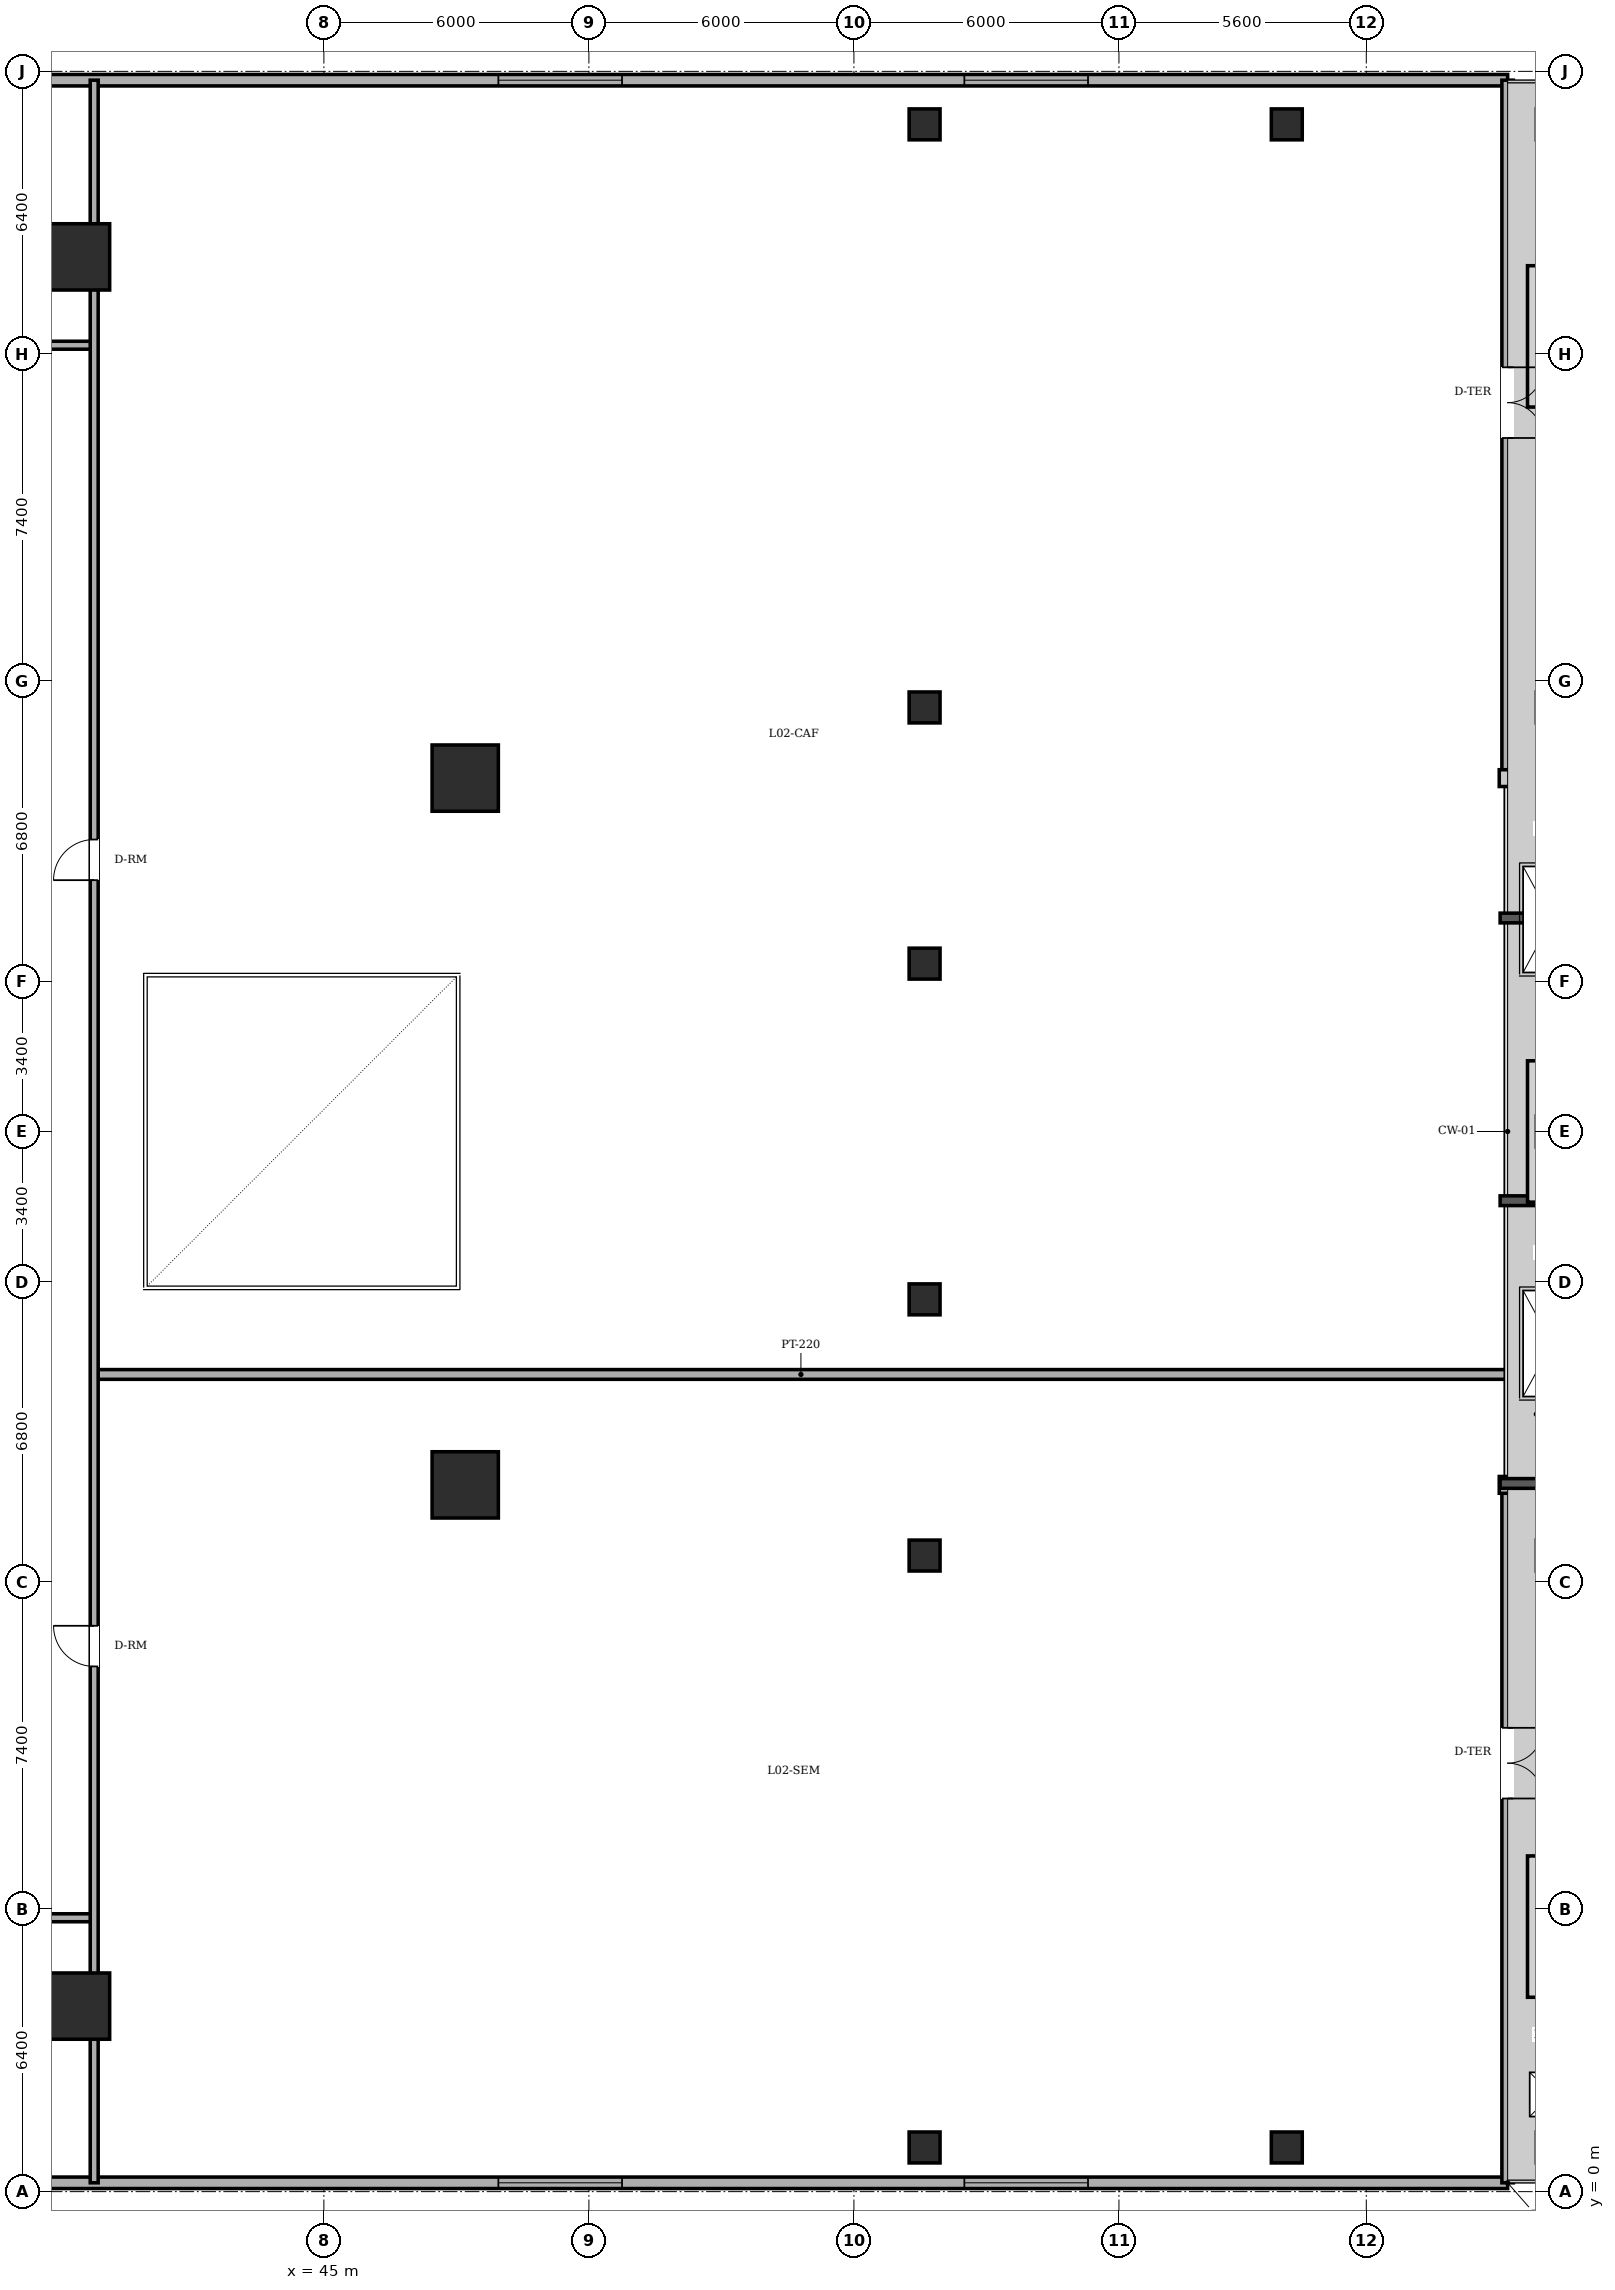
"""IFC4 building model, lengths in metres.
Left out: names, types, materials, properties, quantities, classifications, styles, units other than length and angle.
Written with IfcOpenShell. Run it as: python <this file> out.ifc"""

import sys

from ifc_helpers import new_model, si_unit, direction, frame, frame_2d, origin, origin_2d, place, context, subcontext, project, spatial, rectangle, circle, extrude, element, fill, save


model = new_model("IFC4")
c1 = context("Model", 3, precision=1e-05, world=origin(), true_north=direction((0.0, 1.0)))
c2 = subcontext(c1, "Body", "Model", "MODEL_VIEW")
j1 = project(units=[si_unit("LENGTHUNIT", "METRE"), si_unit("PLANEANGLEUNIT", "RADIAN")], contexts=[c1])
p1 = place(None, origin())
s1 = spatial("IfcSite", under=j1, at=p1, CompositionType="ELEMENT")
p2 = place(p1, origin())
s2 = spatial("IfcBuilding", under=s1, at=p2, CompositionType="ELEMENT")
p3 = place(p2, frame((0.0, 0.0, 5.4)))
s3 = spatial("IfcBuildingStorey", under=s2, at=p3, CompositionType="ELEMENT", Elevation=5.4)
for number, where, z_axis, x_axis in (
    (1, (39.4, 4.2, 0.0), (0.0, 0.0, 1.0), (1.0, 0.0, 0.0)),
    (2, (48.2, 16.0, 0.0), (0.0, 0.0, 1.0), (1.0, 0.0, 0.0)),
    (3, (48.2, 32.0, 0.0), (0.0, 0.0, 1.0), (1.0, 0.0, 0.0)),
    (4, (39.4, 43.8, 0.0), (0.0, 0.0, 1.0), (1.0, 0.0, 0.0)),
):
    element("IfcColumn", number, at=place(p3, frame(where, z_axis=z_axis, x_axis=x_axis)), inside=s3, PredefinedType="COLUMN", context=c2, shape_type="SweptSolid", body=[
        extrude(circle(Radius=0.75, at=origin_2d()), origin(), (0.0, 0.0, 1.0), 4.65),
    ])
for number, where, z_axis, x_axis in (
    (5, (58.6, 1.0, 0.0), (0.0, 0.0, 1.0), (1.0, 0.0, 0.0)),
    (6, (58.6, 46.8, 0.0), (0.0, 0.0, 1.0), (1.0, 0.0, 0.0)),
    (7, (58.6, 20.2, 0.0), (0.0, 0.0, 1.0), (1.0, 0.0, 0.0)),
    (8, (58.6, 27.8, 0.0), (0.0, 0.0, 1.0), (1.0, 0.0, 0.0)),
    (9, (58.6, 14.4, 0.0), (0.0, 0.0, 1.0), (1.0, 0.0, 0.0)),
    (10, (58.6, 33.6, 0.0), (0.0, 0.0, 1.0), (1.0, 0.0, 0.0)),
    (11, (66.8, 1.0, 0.0), (0.0, 0.0, 1.0), (1.0, 0.0, 0.0)),
    (12, (66.8, 46.8, 0.0), (0.0, 0.0, 1.0), (1.0, 0.0, 0.0)),
):
    element("IfcColumn", number, at=place(p3, frame(where, z_axis=z_axis, x_axis=x_axis)), inside=s3, PredefinedType="COLUMN", context=c2, shape_type="SweptSolid", body=[
        extrude(rectangle(XDim=0.7, YDim=0.7, at=origin_2d()), origin(), (0.0, 0.0, 1.0), 4.65),
    ])
p4 = place(p3, frame((71.8, 0.2, 0.0), z_axis=(0.0, 0.0, 1.0), x_axis=(-1.0, 0.0, 0.0)))
e13 = element("IfcWall", 13, at=p4, inside=s3, PredefinedType="SOLIDWALL", context=c2, shape_type="SweptSolid", body=[
    extrude(rectangle(XDim=70.2, YDim=0.26, at=frame_2d((35.1, 0.0))), origin(), (0.0, 0.0, 1.0), 4.43),
])
p5 = place(p4, frame((9.5, 0.0, 0.9)))
e14 = element("IfcOpeningElement", 14, at=p5, cuts=e13, PredefinedType="OPENING", context=c2, shape_type="SweptSolid", body=[
    extrude(rectangle(XDim=2.8, YDim=2.4, at=frame_2d((1.4, 1.2))), frame((0.0, 0.14, 0.0), z_axis=(0.0, -1.0, 0.0), x_axis=(1.0, 0.0, 0.0)), (0.0, 0.0, 1.0), 0.28),
])
p6 = place(p4, frame((20.05, 0.0, 0.9)))
e15 = element("IfcOpeningElement", 15, at=p6, cuts=e13, PredefinedType="OPENING", context=c2, shape_type="SweptSolid", body=[
    extrude(rectangle(XDim=2.8, YDim=2.4, at=frame_2d((1.4, 1.2))), frame((0.0, 0.14, 0.0), z_axis=(0.0, -1.0, 0.0), x_axis=(1.0, 0.0, 0.0)), (0.0, 0.0, 1.0), 0.28),
])
p7 = place(p4, frame((36.733, 0.0, 0.9)))
e16 = element("IfcOpeningElement", 16, at=p7, cuts=e13, PredefinedType="OPENING", context=c2, shape_type="SweptSolid", body=[
    extrude(rectangle(XDim=2.8, YDim=2.4, at=frame_2d((1.4, 1.2))), frame((0.0, 0.14, 0.0), z_axis=(0.0, -1.0, 0.0), x_axis=(1.0, 0.0, 0.0)), (0.0, 0.0, 1.0), 0.28),
])
p8 = place(p4, frame((42.867, 0.0, 0.9)))
e17 = element("IfcOpeningElement", 17, at=p8, cuts=e13, PredefinedType="OPENING", context=c2, shape_type="SweptSolid", body=[
    extrude(rectangle(XDim=2.8, YDim=2.4, at=frame_2d((1.4, 1.2))), frame((0.0, 0.14, 0.0), z_axis=(0.0, -1.0, 0.0), x_axis=(1.0, 0.0, 0.0)), (0.0, 0.0, 1.0), 0.28),
])
p9 = place(p4, frame((55.483, 0.0, 0.9)))
e18 = element("IfcOpeningElement", 18, at=p9, cuts=e13, PredefinedType="OPENING", context=c2, shape_type="SweptSolid", body=[
    extrude(rectangle(XDim=2.8, YDim=2.4, at=frame_2d((1.4, 1.2))), frame((0.0, 0.14, 0.0), z_axis=(0.0, -1.0, 0.0), x_axis=(1.0, 0.0, 0.0)), (0.0, 0.0, 1.0), 0.28),
])
p10 = place(p3, frame((1.6, 47.8, 0.0), z_axis=(0.0, 0.0, 1.0), x_axis=(1.0, 0.0, 0.0)))
e19 = element("IfcWall", 19, at=p10, inside=s3, PredefinedType="SOLIDWALL", context=c2, shape_type="SweptSolid", body=[
    extrude(rectangle(XDim=70.2, YDim=0.26, at=frame_2d((35.1, 0.0))), origin(), (0.0, 0.0, 1.0), 4.43),
])
p11 = place(p10, frame((11.567, 0.0, 0.9)))
e20 = element("IfcOpeningElement", 20, at=p11, cuts=e19, PredefinedType="OPENING", context=c2, shape_type="SweptSolid", body=[
    extrude(rectangle(XDim=2.8, YDim=2.4, at=frame_2d((1.4, 1.2))), frame((0.0, 0.14, 0.0), z_axis=(0.0, -1.0, 0.0), x_axis=(1.0, 0.0, 0.0)), (0.0, 0.0, 1.0), 0.28),
])
p12 = place(p10, frame((24.183, 0.0, 0.9)))
e21 = element("IfcOpeningElement", 21, at=p12, cuts=e19, PredefinedType="OPENING", context=c2, shape_type="SweptSolid", body=[
    extrude(rectangle(XDim=2.8, YDim=2.4, at=frame_2d((1.4, 1.2))), frame((0.0, 0.14, 0.0), z_axis=(0.0, -1.0, 0.0), x_axis=(1.0, 0.0, 0.0)), (0.0, 0.0, 1.0), 0.28),
])
p13 = place(p10, frame((47.35, 0.0, 0.9)))
e22 = element("IfcOpeningElement", 22, at=p13, cuts=e19, PredefinedType="OPENING", context=c2, shape_type="SweptSolid", body=[
    extrude(rectangle(XDim=2.8, YDim=2.4, at=frame_2d((1.4, 1.2))), frame((0.0, 0.14, 0.0), z_axis=(0.0, -1.0, 0.0), x_axis=(1.0, 0.0, 0.0)), (0.0, 0.0, 1.0), 0.28),
])
p14 = place(p10, frame((57.9, 0.0, 0.9)))
e23 = element("IfcOpeningElement", 23, at=p14, cuts=e19, PredefinedType="OPENING", context=c2, shape_type="SweptSolid", body=[
    extrude(rectangle(XDim=2.8, YDim=2.4, at=frame_2d((1.4, 1.2))), frame((0.0, 0.14, 0.0), z_axis=(0.0, -1.0, 0.0), x_axis=(1.0, 0.0, 0.0)), (0.0, 0.0, 1.0), 0.28),
])
p15 = place(p3, frame((71.8, 16.0, 0.0), z_axis=(0.0, 0.0, 1.0), x_axis=(0.0, -1.0, 0.0)))
e24 = element("IfcWall", 24, at=p15, inside=s3, PredefinedType="SOLIDWALL", context=c2, shape_type="SweptSolid", body=[
    extrude(rectangle(XDim=15.8, YDim=0.26, at=frame_2d((7.9, 0.0))), origin(), (0.0, 0.0, 1.0), 4.43),
])
p16 = place(p15, frame((5.5, 0.0, 0.0)))
e25 = element("IfcOpeningElement", 25, at=p16, cuts=e24, PredefinedType="OPENING", context=c2, shape_type="SweptSolid", body=[
    extrude(rectangle(XDim=1.6, YDim=2.3, at=frame_2d((0.8, 1.15))), frame((0.0, 0.14, 0.0), z_axis=(0.0, -1.0, 0.0), x_axis=(1.0, 0.0, 0.0)), (0.0, 0.0, 1.0), 0.28),
])
p17 = place(p3, frame((71.8, 47.8, 0.0), z_axis=(0.0, 0.0, 1.0), x_axis=(0.0, -1.0, 0.0)))
e26 = element("IfcWall", 26, at=p17, inside=s3, PredefinedType="SOLIDWALL", context=c2, shape_type="SweptSolid", body=[
    extrude(rectangle(XDim=15.8, YDim=0.26, at=frame_2d((7.9, 0.0))), origin(), (0.0, 0.0, 1.0), 4.43),
])
p18 = place(p17, frame((6.5, 0.0, 0.0)))
e27 = element("IfcOpeningElement", 27, at=p18, cuts=e26, PredefinedType="OPENING", context=c2, shape_type="SweptSolid", body=[
    extrude(rectangle(XDim=1.6, YDim=2.3, at=frame_2d((0.8, 1.15))), frame((0.0, 0.14, 0.0), z_axis=(0.0, -1.0, 0.0), x_axis=(1.0, 0.0, 0.0)), (0.0, 0.0, 1.0), 0.28),
])
p19 = place(p3, frame((17.89, 6.2, 0.0), z_axis=(0.0, 0.0, 1.0), x_axis=(1.0, 0.0, 0.0)))
e28 = element("IfcWall", 28, at=p19, inside=s3, PredefinedType="PARTITIONING", context=c2, shape_type="SweptSolid", body=[
    extrude(rectangle(XDim=21.91, YDim=0.18, at=frame_2d((10.955, 0.0))), origin(), (0.0, 0.0, 1.0), 4.43),
])
p20 = place(p3, frame((39.8, 18.5, 0.0), z_axis=(0.0, 0.0, 1.0), x_axis=(1.0, 0.0, 0.0)))
e29 = element("IfcWall", 29, at=p20, inside=s3, PredefinedType="PARTITIONING", context=c2, shape_type="SweptSolid", body=[
    extrude(rectangle(XDim=32.0, YDim=0.22, at=frame_2d((16.0, 0.0))), origin(), (0.0, 0.0, 1.0), 4.43),
])
p21 = place(p3, frame((17.89, 41.8, 0.0), z_axis=(0.0, 0.0, 1.0), x_axis=(1.0, 0.0, 0.0)))
e30 = element("IfcWall", 30, at=p21, inside=s3, PredefinedType="PARTITIONING", context=c2, shape_type="SweptSolid", body=[
    extrude(rectangle(XDim=21.91, YDim=0.18, at=frame_2d((10.955, 0.0))), origin(), (0.0, 0.0, 1.0), 4.43),
])
p22 = place(p3, frame((39.8, 0.2, 0.0), z_axis=(0.0, 0.0, 1.0), x_axis=(0.0, 1.0, 0.0)))
e31 = element("IfcWall", 31, at=p22, inside=s3, PredefinedType="PARTITIONING", context=c2, shape_type="SweptSolid", body=[
    extrude(rectangle(XDim=47.6, YDim=0.18, at=frame_2d((23.8, 0.0))), origin(), (0.0, 0.0, 1.0), 4.43),
])
p23 = place(p22, frame((11.69, 0.0, 0.0)))
e32 = element("IfcOpeningElement", 32, at=p23, cuts=e31, PredefinedType="OPENING", context=c2, shape_type="SweptSolid", body=[
    extrude(rectangle(XDim=0.92, YDim=2.1, at=frame_2d((0.46, 1.05))), frame((0.0, 0.1, 0.0), z_axis=(0.0, -1.0, 0.0), x_axis=(1.0, 0.0, 0.0)), (0.0, 0.0, 1.0), 0.2),
])
p24 = place(p22, frame((29.49, 0.0, 0.0)))
e33 = element("IfcOpeningElement", 33, at=p24, cuts=e31, PredefinedType="OPENING", context=c2, shape_type="SweptSolid", body=[
    extrude(rectangle(XDim=0.92, YDim=2.1, at=frame_2d((0.46, 1.05))), frame((0.0, 0.1, 0.0), z_axis=(0.0, -1.0, 0.0), x_axis=(1.0, 0.0, 0.0)), (0.0, 0.0, 1.0), 0.2),
])
p25 = place(p16, origin())
e34 = element("IfcDoor", 34, at=p25, inside=s3, OperationType="DOUBLE_DOOR_SINGLE_SWING", PredefinedType="DOOR", context=c2, shape_type="SweptSolid", body=[
    extrude(rectangle(XDim=1.6, YDim=2.3, at=frame_2d((0.8, 1.15))), frame((0.0, 0.025, 0.0), z_axis=(0.0, -1.0, 0.0), x_axis=(1.0, 0.0, 0.0)), (0.0, 0.0, 1.0), 0.05),
])
fill(e25, e34)
p26 = place(p18, origin())
e35 = element("IfcDoor", 35, at=p26, inside=s3, OperationType="DOUBLE_DOOR_SINGLE_SWING", PredefinedType="DOOR", context=c2, shape_type="SweptSolid", body=[
    extrude(rectangle(XDim=1.6, YDim=2.3, at=frame_2d((0.8, 1.15))), frame((0.0, 0.025, 0.0), z_axis=(0.0, -1.0, 0.0), x_axis=(1.0, 0.0, 0.0)), (0.0, 0.0, 1.0), 0.05),
])
fill(e27, e35)
p27 = place(p13, origin())
e36 = element("IfcWindow", 36, at=p27, inside=s3, PartitioningType="TRIPLE_PANEL_VERTICAL", PredefinedType="WINDOW", context=c2, shape_type="SweptSolid", body=[
    extrude(rectangle(XDim=2.8, YDim=2.4, at=frame_2d((1.4, 1.2))), frame((0.0, 0.03, 0.0), z_axis=(0.0, -1.0, 0.0), x_axis=(1.0, 0.0, 0.0)), (0.0, 0.0, 1.0), 0.06),
])
fill(e22, e36)
p28 = place(p14, origin())
e37 = element("IfcWindow", 37, at=p28, inside=s3, PartitioningType="TRIPLE_PANEL_VERTICAL", PredefinedType="WINDOW", context=c2, shape_type="SweptSolid", body=[
    extrude(rectangle(XDim=2.8, YDim=2.4, at=frame_2d((1.4, 1.2))), frame((0.0, 0.03, 0.0), z_axis=(0.0, -1.0, 0.0), x_axis=(1.0, 0.0, 0.0)), (0.0, 0.0, 1.0), 0.06),
])
fill(e23, e37)
p29 = place(p5, origin())
e38 = element("IfcWindow", 38, at=p29, inside=s3, PartitioningType="TRIPLE_PANEL_VERTICAL", PredefinedType="WINDOW", context=c2, shape_type="SweptSolid", body=[
    extrude(rectangle(XDim=2.8, YDim=2.4, at=frame_2d((1.4, 1.2))), frame((0.0, 0.03, 0.0), z_axis=(0.0, -1.0, 0.0), x_axis=(1.0, 0.0, 0.0)), (0.0, 0.0, 1.0), 0.06),
])
fill(e14, e38)
p30 = place(p6, origin())
e39 = element("IfcWindow", 39, at=p30, inside=s3, PartitioningType="TRIPLE_PANEL_VERTICAL", PredefinedType="WINDOW", context=c2, shape_type="SweptSolid", body=[
    extrude(rectangle(XDim=2.8, YDim=2.4, at=frame_2d((1.4, 1.2))), frame((0.0, 0.03, 0.0), z_axis=(0.0, -1.0, 0.0), x_axis=(1.0, 0.0, 0.0)), (0.0, 0.0, 1.0), 0.06),
])
fill(e15, e39)
p31 = place(p3, frame((0.0, 0.0, -0.21)))
p32 = place(p31, frame((72.8, 19.2, 0.0)))
p33 = place(p32, frame((0.0, 0.0, 0.16)))
e40 = element("IfcWindow", 40, at=p33, inside=s3, PartitioningType="SINGLE_PANEL", PredefinedType="SKYLIGHT", context=c2, shape_type="SweptSolid", body=[
    extrude(rectangle(XDim=1.3, YDim=2.4, at=origin_2d()), origin(), (0.0, 0.0, 1.0), 0.05),
])
p34 = place(p31, frame((72.8, 28.8, 0.0)))
p35 = place(p34, frame((0.0, 0.0, 0.16)))
e41 = element("IfcWindow", 41, at=p35, inside=s3, PartitioningType="SINGLE_PANEL", PredefinedType="SKYLIGHT", context=c2, shape_type="SweptSolid", body=[
    extrude(rectangle(XDim=1.3, YDim=2.4, at=origin_2d()), origin(), (0.0, 0.0, 1.0), 0.05),
])
p36 = place(p31, frame((72.8, 2.2, 0.0)))
p37 = place(p36, frame((0.0, 0.0, 0.16)))
e42 = element("IfcDoor", 42, at=p37, inside=s3, OperationType="SINGLE_SWING_LEFT", PredefinedType="TRAPDOOR", context=c2, shape_type="SweptSolid", body=[
    extrude(rectangle(XDim=1.0, YDim=1.0, at=origin_2d()), origin(), (0.0, 0.0, 1.0), 0.05),
])
p38 = place(p23, origin())
e43 = element("IfcDoor", 43, at=p38, inside=s3, OperationType="SINGLE_SWING_RIGHT", PredefinedType="DOOR", context=c2, shape_type="SweptSolid", body=[
    extrude(rectangle(XDim=0.92, YDim=2.1, at=frame_2d((0.46, 1.05))), frame((0.0, 0.025, 0.0), z_axis=(0.0, -1.0, 0.0), x_axis=(1.0, 0.0, 0.0)), (0.0, 0.0, 1.0), 0.05),
])
fill(e32, e43)
p39 = place(p24, origin())
e44 = element("IfcDoor", 44, at=p39, inside=s3, OperationType="SINGLE_SWING_LEFT", PredefinedType="DOOR", context=c2, shape_type="SweptSolid", body=[
    extrude(rectangle(XDim=0.92, YDim=2.1, at=frame_2d((0.46, 1.05))), frame((0.0, 0.025, 0.0), z_axis=(0.0, -1.0, 0.0), x_axis=(1.0, 0.0, 0.0)), (0.0, 0.0, 1.0), 0.05),
])
fill(e33, e44)
save(model, sys.argv[1])
